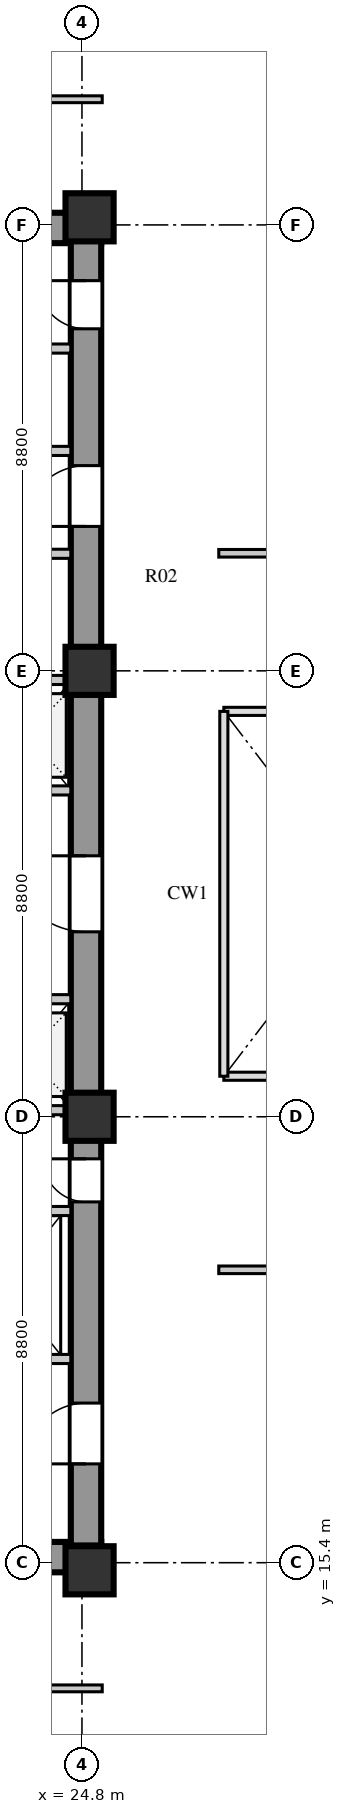
"""IFC4 building model, lengths in metres.
Left out: names, types, materials, properties, quantities, classifications, styles, units other than length and angle.
Written with IfcOpenShell. Run it as: python <this file> out.ifc"""

import sys

from ifc_helpers import new_model, si_unit, direction, frame, frame_2d, origin, origin_2d, place, context, subcontext, project, spatial, rectangle, extrude, element, fill, save


model = new_model("IFC4")
c1 = context("Model", 3, precision=1e-05, world=origin(), true_north=direction((0.0, 1.0)))
c2 = subcontext(c1, "Body", "Model", "MODEL_VIEW")
j1 = project(units=[si_unit("LENGTHUNIT", "METRE"), si_unit("PLANEANGLEUNIT", "RADIAN")], contexts=[c1])
p1 = place(None, origin())
s1 = spatial("IfcSite", under=j1, at=p1, CompositionType="ELEMENT")
p2 = place(p1, origin())
s2 = spatial("IfcBuilding", under=s1, at=p2, CompositionType="ELEMENT")
p3 = place(p2, frame((0.0, 0.0, 12.5)))
s3 = spatial("IfcBuildingStorey", under=s2, at=p3, CompositionType="ELEMENT", Elevation=12.5)
for number, where, z_axis, x_axis in (
    (1, (15.3, 15.51, 0.0), (0.0, 0.0, 1.0), (1.0, 0.0, 0.0)),
    (2, (15.3, 41.74, 0.0), (0.0, 0.0, 1.0), (1.0, 0.0, 0.0)),
):
    element("IfcWall", number, at=place(p3, frame(where, z_axis=z_axis, x_axis=x_axis)), inside=s3, PredefinedType="SHEAR", context=c2, shape_type="SweptSolid", body=[
        extrude(rectangle(XDim=9.88, YDim=0.6, at=frame_2d((4.94, 0.0))), origin(), (0.0, 0.0, 1.0), 4.22),
    ])
p4 = place(p3, frame((24.88, 15.74, 0.0), z_axis=(0.0, 0.0, 1.0), x_axis=(0.0, 1.0, 0.0)))
e3 = element("IfcWall", 3, at=p4, inside=s3, PredefinedType="SHEAR", context=c2, shape_type="SweptSolid", body=[
    extrude(rectangle(XDim=25.76, YDim=0.6, at=frame_2d((12.88, 0.0))), origin(), (0.0, 0.0, 1.0), 4.22),
])
p5 = place(p4, frame((1.61, 0.0, 0.0)))
e4 = element("IfcOpeningElement", 4, at=p5, cuts=e3, PredefinedType="OPENING", context=c2, shape_type="SweptSolid", body=[
    extrude(rectangle(XDim=1.2, YDim=2.1, at=frame_2d((0.6, 1.05))), frame((0.0, 0.31, 0.0), z_axis=(0.0, -1.0, 0.0), x_axis=(1.0, 0.0, 0.0)), (0.0, 0.0, 1.0), 0.62),
])
p6 = place(p4, frame((6.78, 0.0, 0.0)))
e5 = element("IfcOpeningElement", 5, at=p6, cuts=e3, PredefinedType="OPENING", context=c2, shape_type="SweptSolid", body=[
    extrude(rectangle(XDim=0.85, YDim=2.06, at=frame_2d((0.425, 1.03))), frame((0.0, 0.31, 0.0), z_axis=(0.0, -1.0, 0.0), x_axis=(1.0, 0.0, 0.0)), (0.0, 0.0, 1.0), 0.62),
])
p7 = place(p4, frame((12.11, 0.0, 0.0)))
e6 = element("IfcOpeningElement", 6, at=p7, cuts=e3, PredefinedType="OPENING", context=c2, shape_type="SweptSolid", body=[
    extrude(rectangle(XDim=1.5, YDim=2.12, at=frame_2d((0.75, 1.06))), frame((0.0, 0.31, 0.0), z_axis=(0.0, -1.0, 0.0), x_axis=(1.0, 0.0, 0.0)), (0.0, 0.0, 1.0), 0.62),
])
p8 = place(p4, frame((20.11, 0.0, 0.0)))
e7 = element("IfcOpeningElement", 7, at=p8, cuts=e3, PredefinedType="OPENING", context=c2, shape_type="SweptSolid", body=[
    extrude(rectangle(XDim=1.2, YDim=2.12, at=frame_2d((0.6, 1.06))), frame((0.0, 0.31, 0.0), z_axis=(0.0, -1.0, 0.0), x_axis=(1.0, 0.0, 0.0)), (0.0, 0.0, 1.0), 0.62),
])
p9 = place(p4, frame((24.01, 0.0, 0.0)))
e8 = element("IfcOpeningElement", 8, at=p9, cuts=e3, PredefinedType="OPENING", context=c2, shape_type="SweptSolid", body=[
    extrude(rectangle(XDim=0.95, YDim=2.1, at=frame_2d((0.475, 1.05))), frame((0.0, 0.31, 0.0), z_axis=(0.0, -1.0, 0.0), x_axis=(1.0, 0.0, 0.0)), (0.0, 0.0, 1.0), 0.62),
])
for number, where, z_axis, x_axis in (
    (9, (24.95, 15.25, 0.0), (0.0, 0.0, 1.0), (1.0, 0.0, 0.0)),
    (10, (24.95, 24.2, 0.0), (0.0, 0.0, 1.0), (1.0, 0.0, 0.0)),
    (11, (24.95, 33.0, 0.0), (0.0, 0.0, 1.0), (1.0, 0.0, 0.0)),
    (12, (24.95, 41.95, 0.0), (0.0, 0.0, 1.0), (1.0, 0.0, 0.0)),
):
    element("IfcColumn", number, at=place(p3, frame(where, z_axis=z_axis, x_axis=x_axis)), inside=s3, PredefinedType="COLUMN", context=c2, shape_type="SweptSolid", body=[
        extrude(rectangle(XDim=0.95, YDim=0.95, at=origin_2d()), origin(), (0.0, 0.0, 1.0), 4.22),
    ])
p10 = place(p3, frame((19.64, 19.42, 0.0), z_axis=(0.0, 0.0, 1.0), x_axis=(1.0, 0.0, 0.0)))
e13 = element("IfcWall", 13, at=p10, inside=s3, PredefinedType="SOLIDWALL", context=c2, shape_type="SweptSolid", body=[
    extrude(rectangle(XDim=4.94, YDim=0.18, at=frame_2d((2.47, 0.0))), origin(), (0.0, 0.0, 1.0), 4.22),
])
p11 = place(p10, frame((0.72, 0.0, 0.0)))
e14 = element("IfcOpeningElement", 14, at=p11, cuts=e13, PredefinedType="OPENING", context=c2, shape_type="SweptSolid", body=[
    extrude(rectangle(XDim=1.1, YDim=2.1, at=frame_2d((0.55, 1.05))), frame((0.0, 0.1, 0.0), z_axis=(0.0, -1.0, 0.0), x_axis=(1.0, 0.0, 0.0)), (0.0, 0.0, 1.0), 0.2),
])
p12 = place(p10, frame((3.02, 0.0, 0.0)))
e15 = element("IfcOpeningElement", 15, at=p12, cuts=e13, PredefinedType="OPENING", context=c2, shape_type="SweptSolid", body=[
    extrude(rectangle(XDim=1.1, YDim=2.1, at=frame_2d((0.55, 1.05))), frame((0.0, 0.1, 0.0), z_axis=(0.0, -1.0, 0.0), x_axis=(1.0, 0.0, 0.0)), (0.0, 0.0, 1.0), 0.2),
])
p13 = place(p3, frame((19.64, 22.34, 0.0), z_axis=(0.0, 0.0, 1.0), x_axis=(1.0, 0.0, 0.0)))
e16 = element("IfcWall", 16, at=p13, inside=s3, PredefinedType="SOLIDWALL", context=c2, shape_type="SweptSolid", body=[
    extrude(rectangle(XDim=4.94, YDim=0.18, at=frame_2d((2.47, 0.0))), origin(), (0.0, 0.0, 1.0), 4.22),
])
p14 = place(p3, frame((15.9, 26.52, 0.0), z_axis=(0.0, 0.0, 1.0), x_axis=(1.0, 0.0, 0.0)))
e17 = element("IfcWall", 17, at=p14, inside=s3, PredefinedType="SOLIDWALL", context=c2, shape_type="SweptSolid", body=[
    extrude(rectangle(XDim=8.68, YDim=0.18, at=frame_2d((4.34, 0.0))), origin(), (0.0, 0.0, 1.0), 4.22),
])
p15 = place(p14, frame((1.76, 0.0, 0.0)))
e18 = element("IfcOpeningElement", 18, at=p15, cuts=e17, PredefinedType="OPENING", context=c2, shape_type="SweptSolid", body=[
    extrude(rectangle(XDim=1.0, YDim=2.1, at=frame_2d((0.5, 1.05))), frame((0.0, 0.1, 0.0), z_axis=(0.0, -1.0, 0.0), x_axis=(1.0, 0.0, 0.0)), (0.0, 0.0, 1.0), 0.2),
])
p16 = place(p14, frame((3.6, 0.0, 0.0)))
e19 = element("IfcOpeningElement", 19, at=p16, cuts=e17, PredefinedType="OPENING", context=c2, shape_type="SweptSolid", body=[
    extrude(rectangle(XDim=1.0, YDim=2.1, at=frame_2d((0.5, 1.05))), frame((0.0, 0.1, 0.0), z_axis=(0.0, -1.0, 0.0), x_axis=(1.0, 0.0, 0.0)), (0.0, 0.0, 1.0), 0.2),
])
p17 = place(p14, frame((5.44, 0.0, 0.0)))
e20 = element("IfcOpeningElement", 20, at=p17, cuts=e17, PredefinedType="OPENING", context=c2, shape_type="SweptSolid", body=[
    extrude(rectangle(XDim=1.0, YDim=2.1, at=frame_2d((0.5, 1.05))), frame((0.0, 0.1, 0.0), z_axis=(0.0, -1.0, 0.0), x_axis=(1.0, 0.0, 0.0)), (0.0, 0.0, 1.0), 0.2),
])
p18 = place(p14, frame((7.28, 0.0, 0.0)))
e21 = element("IfcOpeningElement", 21, at=p18, cuts=e17, PredefinedType="OPENING", context=c2, shape_type="SweptSolid", body=[
    extrude(rectangle(XDim=1.0, YDim=2.1, at=frame_2d((0.5, 1.05))), frame((0.0, 0.1, 0.0), z_axis=(0.0, -1.0, 0.0), x_axis=(1.0, 0.0, 0.0)), (0.0, 0.0, 1.0), 0.2),
])
p19 = place(p3, frame((15.9, 24.33, 0.0), z_axis=(0.0, 0.0, 1.0), x_axis=(1.0, 0.0, 0.0)))
e22 = element("IfcWall", 22, at=p19, inside=s3, PredefinedType="SOLIDWALL", context=c2, shape_type="SweptSolid", body=[
    extrude(rectangle(XDim=8.68, YDim=0.18, at=frame_2d((4.34, 0.0))), origin(), (0.0, 0.0, 1.0), 3.42),
])
p20 = place(p3, frame((15.9, 30.64, 0.0), z_axis=(0.0, 0.0, 1.0), x_axis=(1.0, 0.0, 0.0)))
e23 = element("IfcWall", 23, at=p20, inside=s3, PredefinedType="SOLIDWALL", context=c2, shape_type="SweptSolid", body=[
    extrude(rectangle(XDim=8.68, YDim=0.18, at=frame_2d((4.34, 0.0))), origin(), (0.0, 0.0, 1.0), 4.22),
])
p21 = place(p20, frame((1.76, 0.0, 0.0)))
e24 = element("IfcOpeningElement", 24, at=p21, cuts=e23, PredefinedType="OPENING", context=c2, shape_type="SweptSolid", body=[
    extrude(rectangle(XDim=1.0, YDim=2.1, at=frame_2d((0.5, 1.05))), frame((0.0, 0.1, 0.0), z_axis=(0.0, -1.0, 0.0), x_axis=(1.0, 0.0, 0.0)), (0.0, 0.0, 1.0), 0.2),
])
p22 = place(p20, frame((3.6, 0.0, 0.0)))
e25 = element("IfcOpeningElement", 25, at=p22, cuts=e23, PredefinedType="OPENING", context=c2, shape_type="SweptSolid", body=[
    extrude(rectangle(XDim=1.0, YDim=2.1, at=frame_2d((0.5, 1.05))), frame((0.0, 0.1, 0.0), z_axis=(0.0, -1.0, 0.0), x_axis=(1.0, 0.0, 0.0)), (0.0, 0.0, 1.0), 0.2),
])
p23 = place(p20, frame((5.44, 0.0, 0.0)))
e26 = element("IfcOpeningElement", 26, at=p23, cuts=e23, PredefinedType="OPENING", context=c2, shape_type="SweptSolid", body=[
    extrude(rectangle(XDim=1.0, YDim=2.1, at=frame_2d((0.5, 1.05))), frame((0.0, 0.1, 0.0), z_axis=(0.0, -1.0, 0.0), x_axis=(1.0, 0.0, 0.0)), (0.0, 0.0, 1.0), 0.2),
])
p24 = place(p20, frame((7.28, 0.0, 0.0)))
e27 = element("IfcOpeningElement", 27, at=p24, cuts=e23, PredefinedType="OPENING", context=c2, shape_type="SweptSolid", body=[
    extrude(rectangle(XDim=1.0, YDim=2.1, at=frame_2d((0.5, 1.05))), frame((0.0, 0.1, 0.0), z_axis=(0.0, -1.0, 0.0), x_axis=(1.0, 0.0, 0.0)), (0.0, 0.0, 1.0), 0.2),
])
p25 = place(p3, frame((15.9, 32.82, 0.0), z_axis=(0.0, 0.0, 1.0), x_axis=(1.0, 0.0, 0.0)))
e28 = element("IfcWall", 28, at=p25, inside=s3, PredefinedType="SOLIDWALL", context=c2, shape_type="SweptSolid", body=[
    extrude(rectangle(XDim=8.68, YDim=0.18, at=frame_2d((4.34, 0.0))), origin(), (0.0, 0.0, 1.0), 3.42),
])
p26 = place(p3, frame((22.02, 35.31, 0.0), z_axis=(0.0, 0.0, 1.0), x_axis=(1.0, 0.0, 0.0)))
e29 = element("IfcWall", 29, at=p26, inside=s3, PredefinedType="SOLIDWALL", context=c2, shape_type="SweptSolid", body=[
    extrude(rectangle(XDim=2.56, YDim=0.18, at=frame_2d((1.28, 0.0))), origin(), (0.0, 0.0, 1.0), 4.22),
])
p27 = place(p26, frame((0.55, 0.0, 0.0)))
e30 = element("IfcOpeningElement", 30, at=p27, cuts=e29, PredefinedType="OPENING", context=c2, shape_type="SweptSolid", body=[
    extrude(rectangle(XDim=1.0, YDim=2.1, at=frame_2d((0.5, 1.05))), frame((0.0, 0.1, 0.0), z_axis=(0.0, -1.0, 0.0), x_axis=(1.0, 0.0, 0.0)), (0.0, 0.0, 1.0), 0.2),
])
p28 = place(p3, frame((19.64, 37.34, 0.0), z_axis=(0.0, 0.0, 1.0), x_axis=(1.0, 0.0, 0.0)))
e31 = element("IfcWall", 31, at=p28, inside=s3, PredefinedType="SOLIDWALL", context=c2, shape_type="SweptSolid", body=[
    extrude(rectangle(XDim=4.94, YDim=0.18, at=frame_2d((2.47, 0.0))), origin(), (0.0, 0.0, 1.0), 4.22),
])
p29 = place(p28, frame((0.45, 0.0, 0.0)))
e32 = element("IfcOpeningElement", 32, at=p29, cuts=e31, PredefinedType="OPENING", context=c2, shape_type="SweptSolid", body=[
    extrude(rectangle(XDim=1.0, YDim=2.1, at=frame_2d((0.5, 1.05))), frame((0.0, 0.1, 0.0), z_axis=(0.0, -1.0, 0.0), x_axis=(1.0, 0.0, 0.0)), (0.0, 0.0, 1.0), 0.2),
])
p30 = place(p28, frame((2.5, 0.0, 0.0)))
e33 = element("IfcOpeningElement", 33, at=p30, cuts=e31, PredefinedType="OPENING", context=c2, shape_type="SweptSolid", body=[
    extrude(rectangle(XDim=1.0, YDim=2.1, at=frame_2d((0.5, 1.05))), frame((0.0, 0.1, 0.0), z_axis=(0.0, -1.0, 0.0), x_axis=(1.0, 0.0, 0.0)), (0.0, 0.0, 1.0), 0.2),
])
p31 = place(p3, frame((19.64, 39.36, 0.0), z_axis=(0.0, 0.0, 1.0), x_axis=(1.0, 0.0, 0.0)))
e34 = element("IfcWall", 34, at=p31, inside=s3, PredefinedType="SOLIDWALL", context=c2, shape_type="SweptSolid", body=[
    extrude(rectangle(XDim=4.94, YDim=0.18, at=frame_2d((2.47, 0.0))), origin(), (0.0, 0.0, 1.0), 4.22),
])
p32 = place(p3, frame((15.2, 12.92, 0.0), z_axis=(0.0, 0.0, 1.0), x_axis=(1.0, 0.0, 0.0)))
e35 = element("IfcWall", 35, at=p32, inside=s3, PredefinedType="PARTITIONING", context=c2, shape_type="SweptSolid", body=[
    extrude(rectangle(XDim=10.0, YDim=0.135, at=frame_2d((5.0, 0.0))), origin(), (0.0, 0.0, 1.0), 4.22),
])
p33 = place(p32, frame((3.6, 0.0, 0.0)))
e36 = element("IfcOpeningElement", 36, at=p33, cuts=e35, PredefinedType="OPENING", context=c2, shape_type="SweptSolid", body=[
    extrude(rectangle(XDim=1.05, YDim=2.1, at=frame_2d((0.525, 1.05))), frame((0.0, 0.078, 0.0), z_axis=(0.0, -1.0, 0.0), x_axis=(1.0, 0.0, 0.0)), (0.0, 0.0, 1.0), 0.155),
])
p34 = place(p3, frame((15.2, 44.28, 0.0), z_axis=(0.0, 0.0, 1.0), x_axis=(1.0, 0.0, 0.0)))
e37 = element("IfcWall", 37, at=p34, inside=s3, PredefinedType="PARTITIONING", context=c2, shape_type="SweptSolid", body=[
    extrude(rectangle(XDim=10.0, YDim=0.135, at=frame_2d((5.0, 0.0))), origin(), (0.0, 0.0, 1.0), 4.22),
])
p35 = place(p34, frame((3.6, 0.0, 0.0)))
e38 = element("IfcOpeningElement", 38, at=p35, cuts=e37, PredefinedType="OPENING", context=c2, shape_type="SweptSolid", body=[
    extrude(rectangle(XDim=1.05, YDim=2.1, at=frame_2d((0.525, 1.05))), frame((0.0, 0.078, 0.0), z_axis=(0.0, -1.0, 0.0), x_axis=(1.0, 0.0, 0.0)), (0.0, 0.0, 1.0), 0.155),
])
p36 = place(p3, frame((27.5, 21.18, 0.0), z_axis=(0.0, 0.0, 1.0), x_axis=(1.0, 0.0, 0.0)))
e39 = element("IfcWall", 39, at=p36, inside=s3, PredefinedType="PARTITIONING", context=c2, shape_type="SweptSolid", body=[
    extrude(rectangle(XDim=7.45, YDim=0.15, at=frame_2d((3.725, 0.0))), origin(), (0.0, 0.0, 1.0), 3.82),
])
p37 = place(p36, frame((2.4, 0.0, 0.0)))
e40 = element("IfcOpeningElement", 40, at=p37, cuts=e39, PredefinedType="OPENING", context=c2, shape_type="SweptSolid", body=[
    extrude(rectangle(XDim=1.2, YDim=2.1, at=frame_2d((0.6, 1.05))), frame((0.0, 0.085, 0.0), z_axis=(0.0, -1.0, 0.0), x_axis=(1.0, 0.0, 0.0)), (0.0, 0.0, 1.0), 0.17),
])
p38 = place(p3, frame((27.5, 35.32, 0.0), z_axis=(0.0, 0.0, 1.0), x_axis=(1.0, 0.0, 0.0)))
e41 = element("IfcWall", 41, at=p38, inside=s3, PredefinedType="PARTITIONING", context=c2, shape_type="SweptSolid", body=[
    extrude(rectangle(XDim=7.22, YDim=0.15, at=frame_2d((3.61, 0.0))), origin(), (0.0, 0.0, 1.0), 4.22),
])
p39 = place(p38, frame((2.4, 0.0, 0.0)))
e42 = element("IfcOpeningElement", 42, at=p39, cuts=e41, PredefinedType="OPENING", context=c2, shape_type="SweptSolid", body=[
    extrude(rectangle(XDim=1.2, YDim=2.1, at=frame_2d((0.6, 1.05))), frame((0.0, 0.085, 0.0), z_axis=(0.0, -1.0, 0.0), x_axis=(1.0, 0.0, 0.0)), (0.0, 0.0, 1.0), 0.17),
])
p40 = place(p5, frame((1.2, 0.0, 0.0), z_axis=(0.0, 0.0, 1.0), x_axis=(-1.0, 0.0, 0.0)))
e43 = element("IfcDoor", 43, at=p40, inside=s3, OperationType="SINGLE_SWING_RIGHT", PredefinedType="DOOR", context=c2, shape_type="SweptSolid", body=[
    extrude(rectangle(XDim=1.2, YDim=2.1, at=frame_2d((0.6, 1.05))), frame((0.0, 0.025, 0.0), z_axis=(0.0, -1.0, 0.0), x_axis=(1.0, 0.0, 0.0)), (0.0, 0.0, 1.0), 0.05),
])
fill(e4, e43)
p41 = place(p6, frame((0.85, 0.0, 0.0), z_axis=(0.0, 0.0, 1.0), x_axis=(-1.0, 0.0, 0.0)))
e44 = element("IfcDoor", 44, at=p41, inside=s3, OperationType="SINGLE_SWING_LEFT", PredefinedType="DOOR", context=c2, shape_type="SweptSolid", body=[
    extrude(rectangle(XDim=0.85, YDim=2.06, at=frame_2d((0.425, 1.03))), frame((0.0, 0.025, 0.0), z_axis=(0.0, -1.0, 0.0), x_axis=(1.0, 0.0, 0.0)), (0.0, 0.0, 1.0), 0.05),
])
fill(e5, e44)
p42 = place(p7, frame((1.5, 0.0, 0.0), z_axis=(0.0, 0.0, 1.0), x_axis=(-1.0, 0.0, 0.0)))
e45 = element("IfcDoor", 45, at=p42, inside=s3, OperationType="SINGLE_SWING_LEFT", PredefinedType="DOOR", context=c2, shape_type="SweptSolid", body=[
    extrude(rectangle(XDim=1.5, YDim=2.12, at=frame_2d((0.75, 1.06))), frame((0.0, 0.025, 0.0), z_axis=(0.0, -1.0, 0.0), x_axis=(1.0, 0.0, 0.0)), (0.0, 0.0, 1.0), 0.05),
])
fill(e6, e45)
p43 = place(p8, frame((1.2, 0.0, 0.0), z_axis=(0.0, 0.0, 1.0), x_axis=(-1.0, 0.0, 0.0)))
e46 = element("IfcDoor", 46, at=p43, inside=s3, OperationType="SINGLE_SWING_RIGHT", PredefinedType="DOOR", context=c2, shape_type="SweptSolid", body=[
    extrude(rectangle(XDim=1.2, YDim=2.12, at=frame_2d((0.6, 1.06))), frame((0.0, 0.025, 0.0), z_axis=(0.0, -1.0, 0.0), x_axis=(1.0, 0.0, 0.0)), (0.0, 0.0, 1.0), 0.05),
])
fill(e7, e46)
p44 = place(p9, frame((0.95, 0.0, 0.0), z_axis=(0.0, 0.0, 1.0), x_axis=(-1.0, 0.0, 0.0)))
e47 = element("IfcDoor", 47, at=p44, inside=s3, OperationType="SINGLE_SWING_LEFT", PredefinedType="DOOR", context=c2, shape_type="SweptSolid", body=[
    extrude(rectangle(XDim=0.95, YDim=2.1, at=frame_2d((0.475, 1.05))), frame((0.0, 0.025, 0.0), z_axis=(0.0, -1.0, 0.0), x_axis=(1.0, 0.0, 0.0)), (0.0, 0.0, 1.0), 0.05),
])
fill(e8, e47)
save(model, sys.argv[1])
